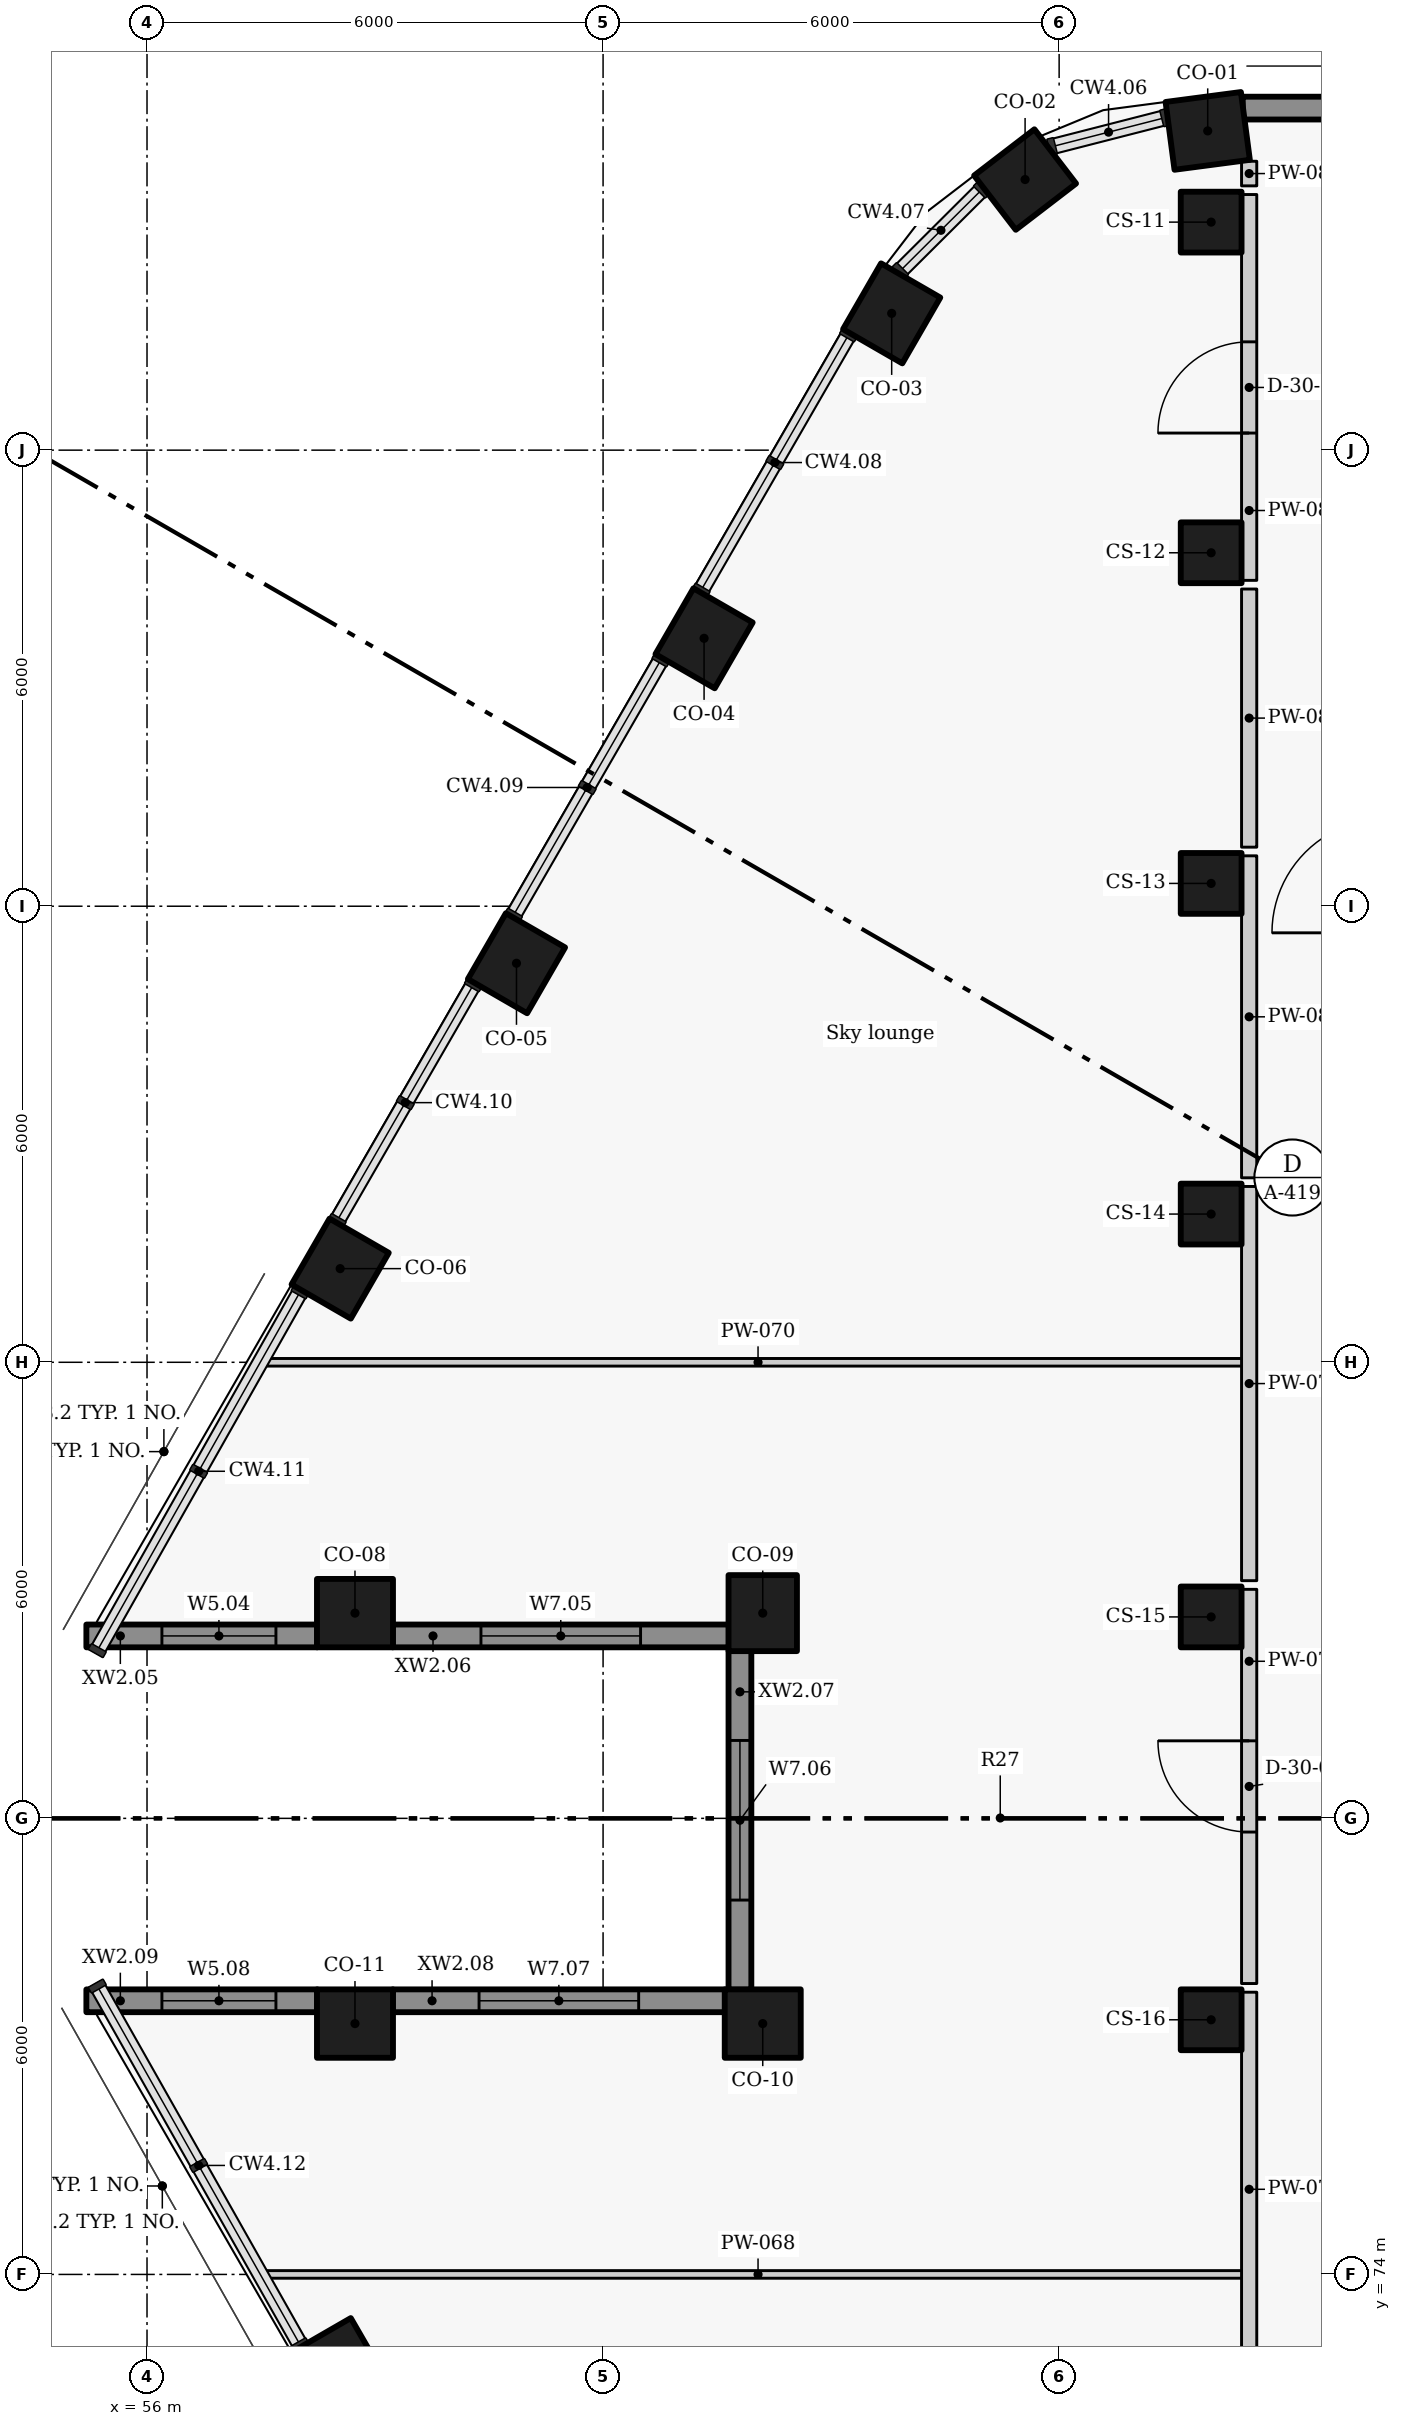
"""IFC4 building model, lengths in metres.
Left out: names, types, materials, properties, quantities, classifications, styles, units other than length and angle.
Written with IfcOpenShell. Run it as: python <this file> out.ifc"""

import sys

from ifc_helpers import new_model, si_unit, direction, frame, frame_2d, origin, origin_2d, place, context, subcontext, project, spatial, rectangle, extrude, element, fill, save


model = new_model("IFC4")
c1 = context("Model", 3, precision=1e-05, world=origin(), true_north=direction((0.0, 1.0)))
c2 = subcontext(c1, "Body", "Model", "MODEL_VIEW")
j1 = project(units=[si_unit("LENGTHUNIT", "METRE"), si_unit("PLANEANGLEUNIT", "RADIAN")], contexts=[c1])
p1 = place(None, origin())
s1 = spatial("IfcSite", under=j1, at=p1, CompositionType="ELEMENT")
p2 = place(p1, origin())
s2 = spatial("IfcBuilding", under=s1, at=p2, CompositionType="ELEMENT")
p3 = place(p2, frame((0.0, 0.0, 272.4)))
s3 = spatial("IfcBuildingStorey", under=s2, at=p3, CompositionType="ELEMENT", Elevation=272.4)
for number, where, z_axis, x_axis in (
    (1, (69.955, 102.2, 0.0), (0.0, 0.0, 1.0), (-0.991, -0.131, 0.0)),
    (2, (67.552, 101.56, 0.0), (0.0, 0.0, 1.0), (-0.793, -0.609, 0.0)),
    (3, (65.797, 99.8, 0.0), (0.0, 0.0, 1.0), (-0.5, -0.866, 0.0)),
    (4, (63.329, 95.525, 0.0), (0.0, 0.0, 1.0), (-0.5, -0.866, 0.0)),
    (5, (60.861, 91.25, 0.0), (0.0, 0.0, 1.0), (-0.5, -0.866, 0.0)),
    (6, (58.541, 87.232, 0.0), (0.0, 0.0, 1.0), (-0.5, -0.866, 0.0)),
    (7, (58.736, 82.7, 0.0), (0.0, 0.0, 1.0), (1.0, 0.0, 0.0)),
    (8, (64.101, 82.7, 0.0), (0.0, 0.0, 1.0), (0.0, -1.0, 0.0)),
    (9, (64.101, 77.3, 0.0), (0.0, 0.0, 1.0), (-1.0, 0.0, 0.0)),
    (10, (58.736, 77.3, 0.0), (0.0, 0.0, 1.0), (-1.0, 0.0, 0.0)),
    (11, (58.541, 72.768, 0.0), (0.0, 0.0, 1.0), (0.5, -0.866, 0.0)),
):
    element("IfcColumn", number, at=place(p3, frame(where, z_axis=z_axis, x_axis=x_axis)), inside=s3, PredefinedType="COLUMN", context=c2, shape_type="SweptSolid", body=[
        extrude(rectangle(XDim=1.0, YDim=0.9, at=origin_2d()), origin(), (0.0, 0.0, 1.0), 3.6),
    ])
for number, where, z_axis, x_axis in (
    (12, (70.0, 101.0, 0.0), (0.0, 0.0, 1.0), (0.0, -1.0, 0.0)),
    (13, (70.0, 96.65, 0.0), (0.0, 0.0, 1.0), (0.0, -1.0, 0.0)),
    (14, (70.0, 92.3, 0.0), (0.0, 0.0, 1.0), (0.0, -1.0, 0.0)),
    (15, (70.0, 87.95, 0.0), (0.0, 0.0, 1.0), (0.0, -1.0, 0.0)),
    (16, (70.0, 82.65, 0.0), (0.0, 0.0, 1.0), (0.0, -1.0, 0.0)),
    (17, (70.0, 77.35, 0.0), (0.0, 0.0, 1.0), (0.0, -1.0, 0.0)),
):
    element("IfcColumn", number, at=place(p3, frame(where, z_axis=z_axis, x_axis=x_axis)), inside=s3, PredefinedType="COLUMN", context=c2, shape_type="SweptSolid", body=[
        extrude(rectangle(XDim=0.8, YDim=0.8, at=origin_2d()), origin(), (0.0, 0.0, 1.0), 3.6),
    ])
p4 = place(p3, frame((89.549, 102.5, 0.0), z_axis=(0.0, 0.0, 1.0), x_axis=(-1.0, 0.0, 0.0)))
e18 = element("IfcWall", 18, at=p4, inside=s3, PredefinedType="SOLIDWALL", context=c2, shape_type="SweptSolid", body=[
    extrude(rectangle(XDim=19.134, YDim=0.3, at=frame_2d((9.567, 0.0))), origin(), (0.0, 0.0, 1.0), 2.725),
])
p5 = place(p3, frame((55.202, 82.4, 0.0), z_axis=(0.0, 0.0, 1.0), x_axis=(1.0, 0.0, 0.0)))
e19 = element("IfcWall", 19, at=p5, inside=s3, PredefinedType="SOLIDWALL", context=c2, shape_type="SweptSolid", body=[
    extrude(rectangle(XDim=3.038, YDim=0.3, at=frame_2d((1.519, 0.0))), origin(), (0.0, 0.0, 1.0), 2.725),
])
p6 = place(p5, frame((0.994, 0.0, 0.9)))
e20 = element("IfcOpeningElement", 20, at=p6, cuts=e19, PredefinedType="OPENING", context=c2, shape_type="SweptSolid", body=[
    extrude(rectangle(XDim=1.5, YDim=1.1, at=frame_2d((0.75, 0.55))), frame((0.0, 0.16, 0.0), z_axis=(0.0, -1.0, 0.0), x_axis=(1.0, 0.0, 0.0)), (0.0, 0.0, 1.0), 0.32),
])
p7 = place(p3, frame((59.232, 82.4, 0.0), z_axis=(0.0, 0.0, 1.0), x_axis=(1.0, 0.0, 0.0)))
e21 = element("IfcWall", 21, at=p7, inside=s3, PredefinedType="SOLIDWALL", context=c2, shape_type="SweptSolid", body=[
    extrude(rectangle(XDim=4.423, YDim=0.3, at=frame_2d((2.211, 0.0))), origin(), (0.0, 0.0, 1.0), 2.725),
])
p8 = place(p7, frame((1.161, 0.0, 0.9)))
e22 = element("IfcOpeningElement", 22, at=p8, cuts=e21, PredefinedType="OPENING", context=c2, shape_type="SweptSolid", body=[
    extrude(rectangle(XDim=2.1, YDim=1.1, at=frame_2d((1.05, 0.55))), frame((0.0, 0.16, 0.0), z_axis=(0.0, -1.0, 0.0), x_axis=(1.0, 0.0, 0.0)), (0.0, 0.0, 1.0), 0.32),
])
p9 = place(p3, frame((63.801, 82.204, 0.0), z_axis=(0.0, 0.0, 1.0), x_axis=(0.0, -1.0, 0.0)))
e23 = element("IfcWall", 23, at=p9, inside=s3, PredefinedType="SOLIDWALL", context=c2, shape_type="SweptSolid", body=[
    extrude(rectangle(XDim=4.458, YDim=0.3, at=frame_2d((2.229, 0.0))), origin(), (0.0, 0.0, 1.0), 2.725),
])
p10 = place(p9, frame((1.179, 0.0, 0.9)))
e24 = element("IfcOpeningElement", 24, at=p10, cuts=e23, PredefinedType="OPENING", context=c2, shape_type="SweptSolid", body=[
    extrude(rectangle(XDim=2.1, YDim=1.1, at=frame_2d((1.05, 0.55))), frame((0.0, 0.16, 0.0), z_axis=(0.0, -1.0, 0.0), x_axis=(1.0, 0.0, 0.0)), (0.0, 0.0, 1.0), 0.32),
])
p11 = place(p3, frame((63.604, 77.6, 0.0), z_axis=(0.0, 0.0, 1.0), x_axis=(-1.0, 0.0, 0.0)))
e25 = element("IfcWall", 25, at=p11, inside=s3, PredefinedType="SOLIDWALL", context=c2, shape_type="SweptSolid", body=[
    extrude(rectangle(XDim=4.373, YDim=0.3, at=frame_2d((2.186, 0.0))), origin(), (0.0, 0.0, 1.0), 2.725),
])
p12 = place(p11, frame((1.136, 0.0, 0.9)))
e26 = element("IfcOpeningElement", 26, at=p12, cuts=e25, PredefinedType="OPENING", context=c2, shape_type="SweptSolid", body=[
    extrude(rectangle(XDim=2.1, YDim=1.1, at=frame_2d((1.05, 0.55))), frame((0.0, 0.16, 0.0), z_axis=(0.0, -1.0, 0.0), x_axis=(1.0, 0.0, 0.0)), (0.0, 0.0, 1.0), 0.32),
])
p13 = place(p3, frame((58.24, 77.6, 0.0), z_axis=(0.0, 0.0, 1.0), x_axis=(-1.0, 0.0, 0.0)))
e27 = element("IfcWall", 27, at=p13, inside=s3, PredefinedType="SOLIDWALL", context=c2, shape_type="SweptSolid", body=[
    extrude(rectangle(XDim=3.038, YDim=0.3, at=frame_2d((1.519, 0.0))), origin(), (0.0, 0.0, 1.0), 2.725),
])
p14 = place(p13, frame((0.544, 0.0, 0.9)))
e28 = element("IfcOpeningElement", 28, at=p14, cuts=e27, PredefinedType="OPENING", context=c2, shape_type="SweptSolid", body=[
    extrude(rectangle(XDim=1.5, YDim=1.1, at=frame_2d((0.75, 0.55))), frame((0.0, 0.16, 0.0), z_axis=(0.0, -1.0, 0.0), x_axis=(1.0, 0.0, 0.0)), (0.0, 0.0, 1.0), 0.32),
])
for number, where, z_axis, x_axis in (
    (29, (57.578, 74.0, 0.0), (0.0, 0.0, 1.0), (1.0, 0.0, 0.0)),
    (30, (57.578, 86.0, 0.0), (0.0, 0.0, 1.0), (1.0, 0.0, 0.0)),
):
    element("IfcWall", number, at=place(p3, frame(where, z_axis=z_axis, x_axis=x_axis)), inside=s3, PredefinedType="PARTITIONING", context=c2, shape_type="SweptSolid", body=[
        extrude(rectangle(XDim=12.922, YDim=0.1, at=frame_2d((6.461, 0.0))), origin(), (0.0, 0.0, 1.0), 3.325),
    ])
p15 = place(p3, frame((70.5, 72.527, 0.0), z_axis=(0.0, 0.0, 1.0), x_axis=(0.0, 1.0, 0.0)))
e31 = element("IfcWall", 31, at=p15, inside=s3, PredefinedType="PARTITIONING", context=c2, shape_type="SweptSolid", body=[
    extrude(rectangle(XDim=5.186, YDim=0.2, at=frame_2d((2.593, 0.0))), origin(), (0.0, 0.0, 1.0), 3.325),
])
p16 = place(p3, frame((70.5, 77.827, 0.0), z_axis=(0.0, 0.0, 1.0), x_axis=(0.0, 1.0, 0.0)))
e32 = element("IfcWall", 32, at=p16, inside=s3, PredefinedType="PARTITIONING", context=c2, shape_type="SweptSolid", body=[
    extrude(rectangle(XDim=5.186, YDim=0.2, at=frame_2d((2.593, 0.0))), origin(), (0.0, 0.0, 1.0), 3.325),
])
p17 = place(p16, frame((1.993, 0.0, 0.0)))
e33 = element("IfcOpeningElement", 33, at=p17, cuts=e32, PredefinedType="OPENING", context=c2, shape_type="SweptSolid", body=[
    extrude(rectangle(XDim=1.2, YDim=2.1, at=frame_2d((0.6, 1.05))), frame((0.0, 0.11, 0.0), z_axis=(0.0, -1.0, 0.0), x_axis=(1.0, 0.0, 0.0)), (0.0, 0.0, 1.0), 0.22),
])
p18 = place(p3, frame((70.5, 83.127, 0.0), z_axis=(0.0, 0.0, 1.0), x_axis=(0.0, 1.0, 0.0)))
e34 = element("IfcWall", 34, at=p18, inside=s3, PredefinedType="PARTITIONING", context=c2, shape_type="SweptSolid", body=[
    extrude(rectangle(XDim=5.186, YDim=0.2, at=frame_2d((2.593, 0.0))), origin(), (0.0, 0.0, 1.0), 3.325),
])
p19 = place(p3, frame((70.5, 88.427, 0.0), z_axis=(0.0, 0.0, 1.0), x_axis=(0.0, 1.0, 0.0)))
e35 = element("IfcWall", 35, at=p19, inside=s3, PredefinedType="PARTITIONING", context=c2, shape_type="SweptSolid", body=[
    extrude(rectangle(XDim=4.236, YDim=0.2, at=frame_2d((2.118, 0.0))), origin(), (0.0, 0.0, 1.0), 3.325),
])
p20 = place(p3, frame((70.5, 92.777, 0.0), z_axis=(0.0, 0.0, 1.0), x_axis=(0.0, 1.0, 0.0)))
e36 = element("IfcWall", 36, at=p20, inside=s3, PredefinedType="PARTITIONING", context=c2, shape_type="SweptSolid", body=[
    extrude(rectangle(XDim=3.396, YDim=0.2, at=frame_2d((1.698, 0.0))), origin(), (0.0, 0.0, 1.0), 3.325),
])
p21 = place(p3, frame((70.5, 96.287, 0.0), z_axis=(0.0, 0.0, 1.0), x_axis=(0.0, 1.0, 0.0)))
e37 = element("IfcWall", 37, at=p21, inside=s3, PredefinedType="PARTITIONING", context=c2, shape_type="SweptSolid", body=[
    extrude(rectangle(XDim=5.076, YDim=0.2, at=frame_2d((2.538, 0.0))), origin(), (0.0, 0.0, 1.0), 3.325),
])
p22 = place(p21, frame((1.938, 0.0, 0.0)))
e38 = element("IfcOpeningElement", 38, at=p22, cuts=e37, PredefinedType="OPENING", context=c2, shape_type="SweptSolid", body=[
    extrude(rectangle(XDim=1.2, YDim=2.1, at=frame_2d((0.6, 1.05))), frame((0.0, 0.11, 0.0), z_axis=(0.0, -1.0, 0.0), x_axis=(1.0, 0.0, 0.0)), (0.0, 0.0, 1.0), 0.22),
])
p23 = place(p3, frame((70.5, 101.477, 0.0), z_axis=(0.0, 0.0, 1.0), x_axis=(0.0, 1.0, 0.0)))
e39 = element("IfcWall", 39, at=p23, inside=s3, PredefinedType="PARTITIONING", context=c2, shape_type="SweptSolid", body=[
    extrude(rectangle(XDim=0.324, YDim=0.2, at=frame_2d((0.162, 0.0))), origin(), (0.0, 0.0, 1.0), 3.325),
])
p24 = place(p6, origin())
e40 = element("IfcWindow", 40, at=p24, inside=s3, PartitioningType="SINGLE_PANEL", PredefinedType="WINDOW", context=c2, shape_type="SweptSolid", body=[
    extrude(rectangle(XDim=1.5, YDim=1.1, at=frame_2d((0.75, 0.55))), frame((0.0, 0.03, 0.0), z_axis=(0.0, -1.0, 0.0), x_axis=(1.0, 0.0, 0.0)), (0.0, 0.0, 1.0), 0.06),
])
fill(e20, e40)
p25 = place(p8, origin())
e41 = element("IfcWindow", 41, at=p25, inside=s3, PartitioningType="SINGLE_PANEL", PredefinedType="WINDOW", context=c2, shape_type="SweptSolid", body=[
    extrude(rectangle(XDim=2.1, YDim=1.1, at=frame_2d((1.05, 0.55))), frame((0.0, 0.03, 0.0), z_axis=(0.0, -1.0, 0.0), x_axis=(1.0, 0.0, 0.0)), (0.0, 0.0, 1.0), 0.06),
])
fill(e22, e41)
p26 = place(p10, origin())
e42 = element("IfcWindow", 42, at=p26, inside=s3, PartitioningType="SINGLE_PANEL", PredefinedType="WINDOW", context=c2, shape_type="SweptSolid", body=[
    extrude(rectangle(XDim=2.1, YDim=1.1, at=frame_2d((1.05, 0.55))), frame((0.0, 0.03, 0.0), z_axis=(0.0, -1.0, 0.0), x_axis=(1.0, 0.0, 0.0)), (0.0, 0.0, 1.0), 0.06),
])
fill(e24, e42)
p27 = place(p12, origin())
e43 = element("IfcWindow", 43, at=p27, inside=s3, PartitioningType="SINGLE_PANEL", PredefinedType="WINDOW", context=c2, shape_type="SweptSolid", body=[
    extrude(rectangle(XDim=2.1, YDim=1.1, at=frame_2d((1.05, 0.55))), frame((0.0, 0.03, 0.0), z_axis=(0.0, -1.0, 0.0), x_axis=(1.0, 0.0, 0.0)), (0.0, 0.0, 1.0), 0.06),
])
fill(e26, e43)
p28 = place(p14, origin())
e44 = element("IfcWindow", 44, at=p28, inside=s3, PartitioningType="SINGLE_PANEL", PredefinedType="WINDOW", context=c2, shape_type="SweptSolid", body=[
    extrude(rectangle(XDim=1.5, YDim=1.1, at=frame_2d((0.75, 0.55))), frame((0.0, 0.03, 0.0), z_axis=(0.0, -1.0, 0.0), x_axis=(1.0, 0.0, 0.0)), (0.0, 0.0, 1.0), 0.06),
])
fill(e28, e44)
p29 = place(p17, origin())
e45 = element("IfcDoor", 45, at=p29, inside=s3, OperationType="SINGLE_SWING_RIGHT", PredefinedType="DOOR", context=c2, shape_type="SweptSolid", body=[
    extrude(rectangle(XDim=1.2, YDim=2.1, at=frame_2d((0.6, 1.05))), frame((0.0, 0.025, 0.0), z_axis=(0.0, -1.0, 0.0), x_axis=(1.0, 0.0, 0.0)), (0.0, 0.0, 1.0), 0.05),
])
fill(e33, e45)
p30 = place(p22, origin())
e46 = element("IfcDoor", 46, at=p30, inside=s3, OperationType="SINGLE_SWING_LEFT", PredefinedType="DOOR", context=c2, shape_type="SweptSolid", body=[
    extrude(rectangle(XDim=1.2, YDim=2.1, at=frame_2d((0.6, 1.05))), frame((0.0, 0.025, 0.0), z_axis=(0.0, -1.0, 0.0), x_axis=(1.0, 0.0, 0.0)), (0.0, 0.0, 1.0), 0.05),
])
fill(e38, e46)
save(model, sys.argv[1])
